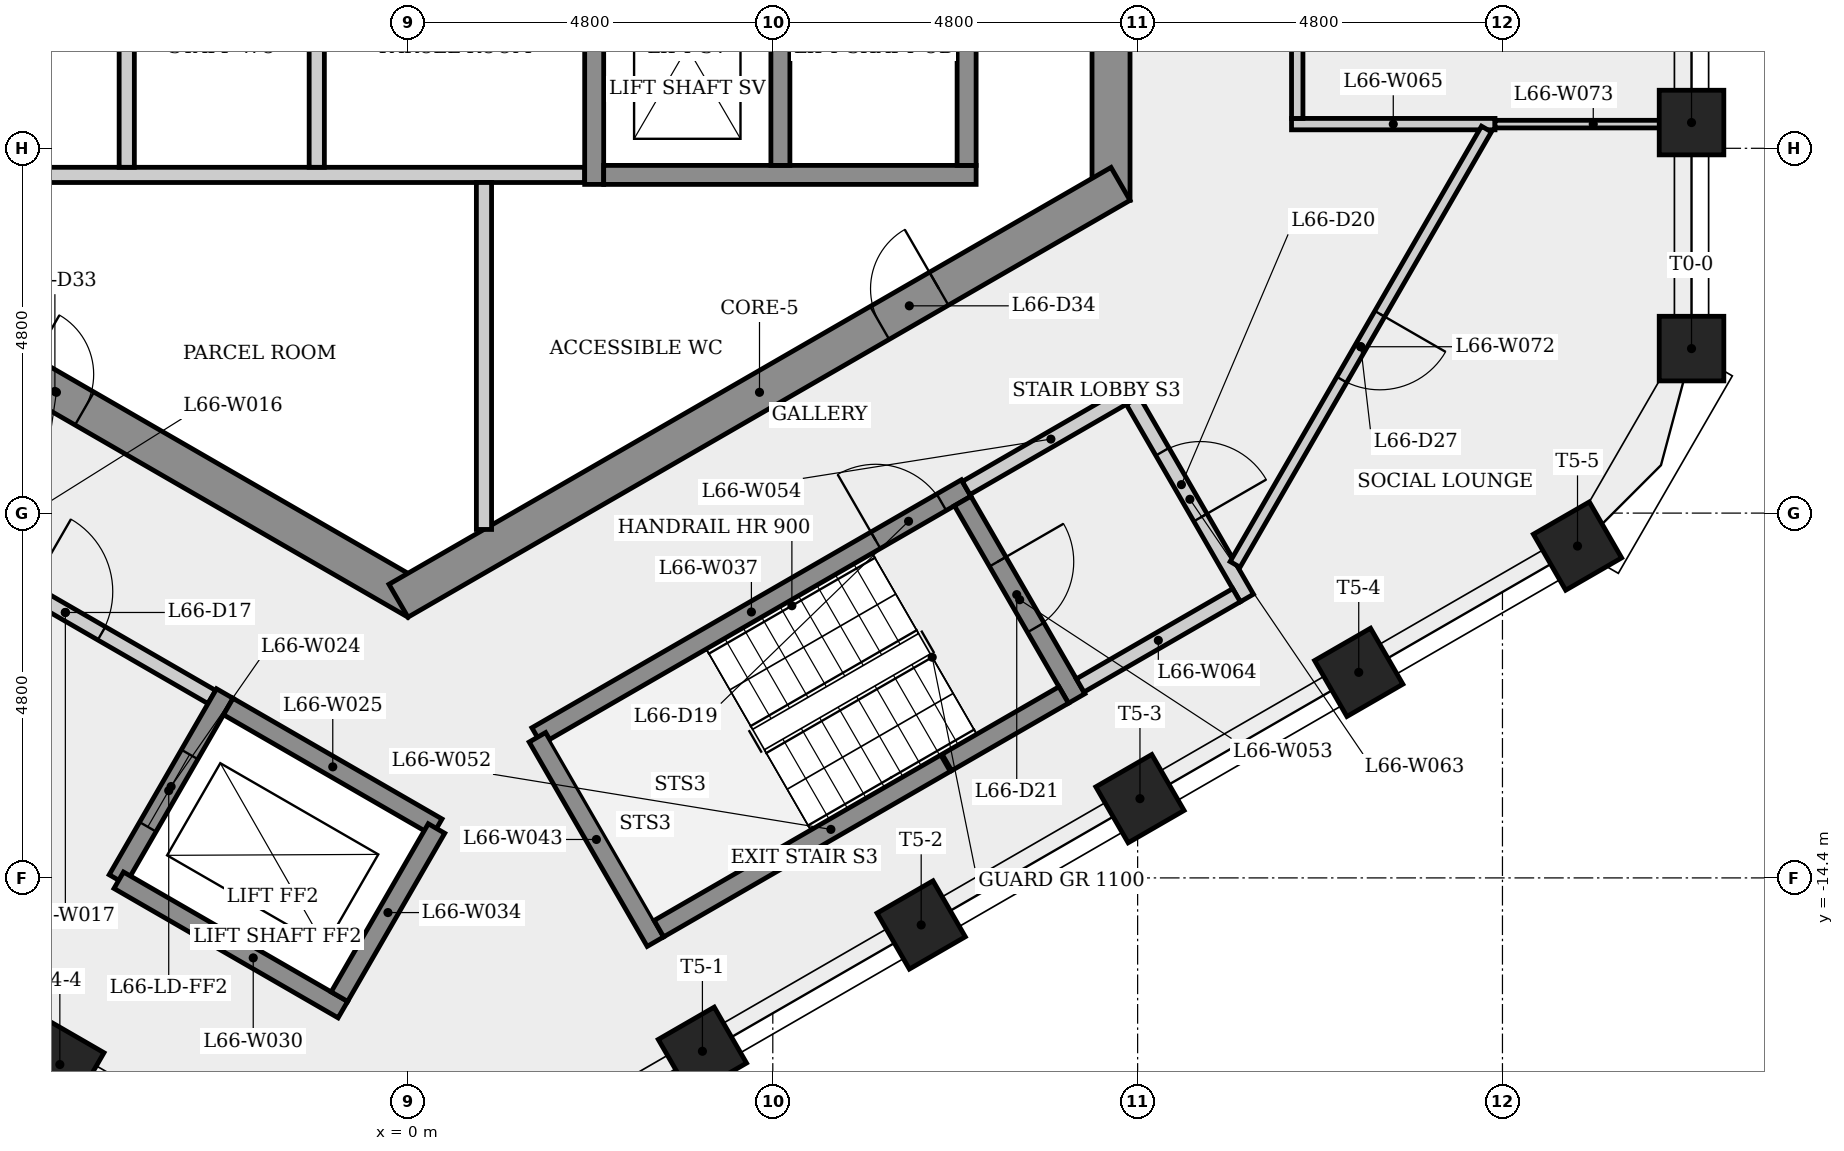
"""IFC4 building model, lengths in metres.
Left out: names, types, materials, properties, quantities, classifications, styles, units other than length and angle.
Written with IfcOpenShell. Run it as: python <this file> out.ifc"""

import sys

from ifc_helpers import new_model, si_unit, direction, frame, frame_2d, origin, origin_2d, place, context, subcontext, project, spatial, rectangle, extrude, element, fill, save


model = new_model("IFC4")
c1 = context("Model", 3, precision=1e-05, world=origin(), true_north=direction((0.0, 1.0)))
c2 = subcontext(c1, "Body", "Model", "MODEL_VIEW")
j1 = project(units=[si_unit("LENGTHUNIT", "METRE"), si_unit("PLANEANGLEUNIT", "RADIAN")], contexts=[c1])
p1 = place(None, origin())
s1 = spatial("IfcSite", under=j1, at=p1, CompositionType="ELEMENT")
p2 = place(p1, origin())
s2 = spatial("IfcBuilding", under=s1, at=p2, CompositionType="ELEMENT")
p3 = place(p2, frame((0.0, 0.0, 246.1)))
s3 = spatial("IfcBuildingStorey", under=s2, at=p3, CompositionType="ELEMENT", Elevation=246.1)
p4 = place(p3, frame((9.25, -5.485, 0.0), z_axis=(0.0, 0.0, 1.0), x_axis=(0.0, 1.0, 0.0)))
e1 = element("IfcWall", 1, at=p4, inside=s3, PredefinedType="SHEAR", context=c2, shape_type="SweptSolid", body=[
    extrude(rectangle(XDim=10.97, YDim=0.5, at=frame_2d((5.485, 0.0))), origin(), (0.0, 0.0, 1.0), 3.4),
])
p5 = place(p4, frame((4.685, 0.0, 0.0)))
e2 = element("IfcOpeningElement", 2, at=p5, cuts=e1, PredefinedType="OPENING", context=c2, shape_type="SweptSolid", body=[
    extrude(rectangle(XDim=1.6, YDim=2.1, at=frame_2d((0.8, 1.05))), frame((0.0, 0.26, 0.0), z_axis=(0.0, -1.0, 0.0), x_axis=(1.0, 0.0, 0.0)), (0.0, 0.0, 1.0), 0.52),
])
p6 = place(p3, frame((-9.375, -5.268, 0.0), z_axis=(0.0, 0.0, 1.0), x_axis=(0.866023993627, -0.500002442456, 0.0)))
e3 = element("IfcWall", 3, at=p6, inside=s3, PredefinedType="SHEAR", context=c2, shape_type="SweptSolid", body=[
    extrude(rectangle(XDim=10.97, YDim=0.5, at=frame_2d((5.485, 0.0))), origin(), (0.0, 0.0, 1.0), 3.4),
])
p7 = place(p6, frame((5.011, 0.0, 0.0)))
e4 = element("IfcOpeningElement", 4, at=p7, cuts=e3, PredefinedType="OPENING", context=c2, shape_type="SweptSolid", body=[
    extrude(rectangle(XDim=0.9, YDim=2.1, at=frame_2d((0.45, 1.05))), frame((0.0, 0.26, 0.0), z_axis=(0.0, -1.0, 0.0), x_axis=(1.0, 0.0, 0.0)), (0.0, 0.0, 1.0), 0.52),
])
p8 = place(p3, frame((-0.125, -10.753, 0.0), z_axis=(0.0, 0.0, 1.0), x_axis=(0.866023993627, 0.500002442456, 0.0)))
e5 = element("IfcWall", 5, at=p8, inside=s3, PredefinedType="SHEAR", context=c2, shape_type="SweptSolid", body=[
    extrude(rectangle(XDim=10.97, YDim=0.5, at=frame_2d((5.485, 0.0))), origin(), (0.0, 0.0, 1.0), 3.4),
])
p9 = place(p8, frame((7.311, 0.0, 0.0)))
e6 = element("IfcOpeningElement", 6, at=p9, cuts=e5, PredefinedType="OPENING", context=c2, shape_type="SweptSolid", body=[
    extrude(rectangle(XDim=0.9, YDim=2.1, at=frame_2d((0.45, 1.05))), frame((0.0, 0.26, 0.0), z_axis=(0.0, -1.0, 0.0), x_axis=(1.0, 0.0, 0.0)), (0.0, 0.0, 1.0), 0.52),
])
for number, where, z_axis, x_axis in (
    (7, (16.887, -7.436, 0.0), (0.0, 0.0, 1.0), (1.0, 0.0, 0.0)),
    (8, (16.887, -4.461, 0.0), (0.0, 0.0, 1.0), (1.0, 0.0, 0.0)),
    (9, (-4.58, -16.856, 0.0), (0.0, 0.0, 1.0), (-0.5, -0.866, 0.0)),
    (10, (3.874, -16.681, 0.0), (0.0, 0.0, 1.0), (0.5, -0.866, 0.0)),
    (11, (6.752, -15.019, 0.0), (0.0, 0.0, 1.0), (0.5, -0.866, 0.0)),
    (12, (9.631, -13.357, 0.0), (0.0, 0.0, 1.0), (0.5, -0.866, 0.0)),
    (13, (12.509, -11.695, 0.0), (0.0, 0.0, 1.0), (0.5, -0.866, 0.0)),
    (14, (15.387, -10.033, 0.0), (0.0, 0.0, 1.0), (0.5, -0.866, 0.0)),
):
    element("IfcColumn", number, at=place(p3, frame(where, z_axis=z_axis, x_axis=x_axis)), inside=s3, PredefinedType="COLUMN", context=c2, shape_type="SweptSolid", body=[
        extrude(rectangle(XDim=0.85, YDim=0.85, at=origin_2d()), origin(), (0.0, 0.0, 1.0), 3.4),
    ])
p10 = place(p3, frame((-9.0, -5.15, 0.0), z_axis=(0.0, 0.0, 1.0), x_axis=(1.0, 0.0, 0.0)))
e15 = element("IfcWall", 15, at=p10, inside=s3, PredefinedType="PARTITIONING", context=c2, shape_type="SweptSolid", body=[
    extrude(rectangle(XDim=11.325, YDim=0.2, at=frame_2d((5.663, 0.0))), origin(), (0.0, 0.0, 1.0), 3.05),
])
p11 = place(p3, frame((-6.435, -9.795, 0.0), z_axis=(0.0, 0.0, 1.0), x_axis=(0.866012907634, -0.500021643343, 0.0)))
e16 = element("IfcWall", 16, at=p11, inside=s3, PredefinedType="PARTITIONING", context=c2, shape_type="SweptSolid", body=[
    extrude(rectangle(XDim=4.45, YDim=0.2, at=frame_2d((2.225, 0.0))), origin(), (0.0, 0.0, 1.0), 3.05),
])
p12 = place(p11, frame((1.675, 0.0, 0.0)))
e17 = element("IfcOpeningElement", 17, at=p12, cuts=e16, PredefinedType="OPENING", context=c2, shape_type="SweptSolid", body=[
    extrude(rectangle(XDim=1.1, YDim=2.1, at=frame_2d((0.55, 1.05))), frame((0.0, 0.11, 0.0), z_axis=(0.0, -1.0, 0.0), x_axis=(1.0, 0.0, 0.0)), (0.0, 0.0, 1.0), 0.22),
])
p13 = place(p3, frame((-3.7, -1.9, 0.0), z_axis=(0.0, 0.0, 1.0), x_axis=(0.0, -1.0, 0.0)))
e18 = element("IfcWall", 18, at=p13, inside=s3, PredefinedType="PARTITIONING", context=c2, shape_type="SweptSolid", body=[
    extrude(rectangle(XDim=3.15, YDim=0.2, at=frame_2d((1.575, 0.0))), origin(), (0.0, 0.0, 1.0), 3.05),
])
p14 = place(p3, frame((-2.41, -11.974, 0.0), z_axis=(0.0, 0.0, 1.0), x_axis=(-0.49998675294, -0.866033051843, 0.0)))
e19 = element("IfcWall", 19, at=p14, inside=s3, PredefinedType="SHEAR", context=c2, shape_type="SweptSolid", body=[
    extrude(rectangle(XDim=2.825, YDim=0.25, at=frame_2d((1.413, 0.0))), origin(), (0.0, 0.0, 1.0), 3.05),
])
p15 = place(p14, frame((0.926, 0.0, 0.0)))
e20 = element("IfcOpeningElement", 20, at=p15, cuts=e19, PredefinedType="OPENING", context=c2, shape_type="SweptSolid", body=[
    extrude(rectangle(XDim=1.1, YDim=2.1, at=frame_2d((0.55, 1.05))), frame((0.0, 0.135, 0.0), z_axis=(0.0, -1.0, 0.0), x_axis=(1.0, 0.0, 0.0)), (0.0, 0.0, 1.0), 0.27),
])
p16 = place(p3, frame((-2.364, -12.145, 0.0), z_axis=(0.0, 0.0, 1.0), x_axis=(0.866048579423, -0.499959856469, 0.0)))
e21 = element("IfcWall", 21, at=p16, inside=s3, PredefinedType="SHEAR", context=c2, shape_type="SweptSolid", body=[
    extrude(rectangle(XDim=3.175, YDim=0.25, at=frame_2d((1.587, 0.0))), origin(), (0.0, 0.0, 1.0), 3.4),
])
p17 = place(p3, frame((-1.2, -1.9, 0.0), z_axis=(0.0, 0.0, 1.0), x_axis=(0.0, -1.0, 0.0)))
e22 = element("IfcWall", 22, at=p17, inside=s3, PredefinedType="PARTITIONING", context=c2, shape_type="SweptSolid", body=[
    extrude(rectangle(XDim=3.15, YDim=0.2, at=frame_2d((1.575, 0.0))), origin(), (0.0, 0.0, 1.0), 3.05),
])
p18 = place(p3, frame((-0.856, -16.133, 0.0), z_axis=(0.0, 0.0, 1.0), x_axis=(-0.866032748241, 0.499987278812, 0.0)))
e23 = element("IfcWall", 23, at=p18, inside=s3, PredefinedType="SHEAR", context=c2, shape_type="SweptSolid", body=[
    extrude(rectangle(XDim=3.405, YDim=0.25, at=frame_2d((1.702, 0.0))), origin(), (0.0, 0.0, 1.0), 3.05),
])
p19 = place(p3, frame((0.375, -13.75, 0.0), z_axis=(0.0, 0.0, 1.0), x_axis=(-0.50003400563, -0.866005769735, 0.0)))
e24 = element("IfcWall", 24, at=p19, inside=s3, PredefinedType="SHEAR", context=c2, shape_type="SweptSolid", body=[
    extrude(rectangle(XDim=2.555, YDim=0.25, at=frame_2d((1.277, 0.0))), origin(), (0.0, 0.0, 1.0), 3.4),
])
p20 = place(p3, frame((1.0, -5.25, 0.0), z_axis=(0.0, 0.0, 1.0), x_axis=(0.0, -1.0, 0.0)))
e25 = element("IfcWall", 25, at=p20, inside=s3, PredefinedType="PARTITIONING", context=c2, shape_type="SweptSolid", body=[
    extrude(rectangle(XDim=4.565, YDim=0.2, at=frame_2d((2.282, 0.0))), origin(), (0.0, 0.0, 1.0), 3.05),
])
p21 = place(p3, frame((1.693, -12.532, 0.0), z_axis=(0.0, 0.0, 1.0), x_axis=(0.866031063448, 0.499990197047, 0.0)))
e26 = element("IfcWall", 26, at=p21, inside=s3, PredefinedType="SHEAR", context=c2, shape_type="SweptSolid", body=[
    extrude(rectangle(XDim=6.525, YDim=0.25, at=frame_2d((3.263, 0.0))), origin(), (0.0, 0.0, 1.0), 3.05),
])
p22 = place(p21, frame((5.15, 0.0, 0.0)))
e27 = element("IfcOpeningElement", 27, at=p22, cuts=e26, PredefinedType="OPENING", context=c2, shape_type="SweptSolid", body=[
    extrude(rectangle(XDim=1.0, YDim=2.1, at=frame_2d((0.5, 1.05))), frame((0.0, 0.135, 0.0), z_axis=(0.0, -1.0, 0.0), x_axis=(1.0, 0.0, 0.0)), (0.0, 0.0, 1.0), 0.27),
])
p23 = place(p3, frame((2.45, -5.275, 0.0), z_axis=(0.0, 0.0, 1.0), x_axis=(0.0, 1.0, 0.0)))
e28 = element("IfcWall", 28, at=p23, inside=s3, PredefinedType="SHEAR", context=c2, shape_type="SweptSolid", body=[
    extrude(rectangle(XDim=3.6, YDim=0.25, at=frame_2d((1.8, 0.0))), origin(), (0.0, 0.0, 1.0), 3.05),
])
p24 = place(p3, frame((3.256, -15.239, 0.0), z_axis=(0.0, 0.0, 1.0), x_axis=(-0.500003782172, 0.866023220135, 0.0)))
e29 = element("IfcWall", 29, at=p24, inside=s3, PredefinedType="SHEAR", context=c2, shape_type="SweptSolid", body=[
    extrude(rectangle(XDim=3.105, YDim=0.25, at=frame_2d((1.552, 0.0))), origin(), (0.0, 0.0, 1.0), 3.05),
])
p25 = place(p3, frame((2.575, -5.15, 0.0), z_axis=(0.0, 0.0, 1.0), x_axis=(1.0, 0.0, 0.0)))
e30 = element("IfcWall", 30, at=p25, inside=s3, PredefinedType="SHEAR", context=c2, shape_type="SweptSolid", body=[
    extrude(rectangle(XDim=4.9, YDim=0.25, at=frame_2d((2.45, 0.0))), origin(), (0.0, 0.0, 1.0), 3.05),
])
p26 = place(p3, frame((4.9, -1.925, 0.0), z_axis=(0.0, 0.0, 1.0), x_axis=(0.0, -1.0, 0.0)))
e31 = element("IfcWall", 31, at=p26, inside=s3, PredefinedType="SHEAR", context=c2, shape_type="SweptSolid", body=[
    extrude(rectangle(XDim=3.1, YDim=0.25, at=frame_2d((1.55, 0.0))), origin(), (0.0, 0.0, 1.0), 3.4),
])
p27 = place(p3, frame((7.073, -12.891, 0.0), z_axis=(0.0, 0.0, 1.0), x_axis=(-0.866023145199, -0.500003911965, 0.0)))
e32 = element("IfcWall", 32, at=p27, inside=s3, PredefinedType="SHEAR", context=c2, shape_type="SweptSolid", body=[
    extrude(rectangle(XDim=4.355, YDim=0.25, at=frame_2d((2.177, 0.0))), origin(), (0.0, 0.0, 1.0), 3.05),
])
p28 = place(p3, frame((7.298, -9.441, 0.0), z_axis=(0.0, 0.0, 1.0), x_axis=(0.50002537861, -0.866010750942, 0.0)))
e33 = element("IfcWall", 33, at=p28, inside=s3, PredefinedType="SHEAR", context=c2, shape_type="SweptSolid", body=[
    extrude(rectangle(XDim=3.0, YDim=0.25, at=frame_2d((1.5, 0.0))), origin(), (0.0, 0.0, 1.0), 3.05),
])
p29 = place(p28, frame((0.923, 0.0, 0.0)))
e34 = element("IfcOpeningElement", 34, at=p29, cuts=e33, PredefinedType="OPENING", context=c2, shape_type="SweptSolid", body=[
    extrude(rectangle(XDim=1.0, YDim=2.1, at=frame_2d((0.5, 1.05))), frame((0.0, 0.135, 0.0), z_axis=(0.0, -1.0, 0.0), x_axis=(1.0, 0.0, 0.0)), (0.0, 0.0, 1.0), 0.27),
])
p30 = place(p3, frame((7.344, -9.27, 0.0), z_axis=(0.0, 0.0, 1.0), x_axis=(0.866005588531, 0.500034319456, 0.0)))
e35 = element("IfcWall", 35, at=p30, inside=s3, PredefinedType="PARTITIONING", context=c2, shape_type="SweptSolid", body=[
    extrude(rectangle(XDim=2.575, YDim=0.2, at=frame_2d((1.288, 0.0))), origin(), (0.0, 0.0, 1.0), 3.05),
])
p31 = place(p3, frame((7.35, -1.925, 0.0), z_axis=(0.0, 0.0, 1.0), x_axis=(0.0, -1.0, 0.0)))
e36 = element("IfcWall", 36, at=p31, inside=s3, PredefinedType="SHEAR", context=c2, shape_type="SweptSolid", body=[
    extrude(rectangle(XDim=3.1, YDim=0.25, at=frame_2d((1.55, 0.0))), origin(), (0.0, 0.0, 1.0), 3.4),
])
p32 = place(p3, frame((8.627, -11.993, 0.0), z_axis=(0.0, 0.0, 1.0), x_axis=(-0.866059624469, -0.499940723351, 0.0)))
e37 = element("IfcWall", 37, at=p32, inside=s3, PredefinedType="SHEAR", context=c2, shape_type="SweptSolid", body=[
    extrude(rectangle(XDim=1.775, YDim=0.25, at=frame_2d((0.888, 0.0))), origin(), (0.0, 0.0, 1.0), 3.05),
])
p33 = place(p3, frame((9.537, -8.119, 0.0), z_axis=(0.0, 0.0, 1.0), x_axis=(0.499990139034, -0.866031096941, 0.0)))
e38 = element("IfcWall", 38, at=p33, inside=s3, PredefinedType="PARTITIONING", context=c2, shape_type="SweptSolid", body=[
    extrude(rectangle(XDim=3.0, YDim=0.2, at=frame_2d((1.5, 0.0))), origin(), (0.0, 0.0, 1.0), 3.05),
])
p34 = place(p33, frame((0.778, 0.0, 0.0)))
e39 = element("IfcOpeningElement", 39, at=p34, cuts=e38, PredefinedType="OPENING", context=c2, shape_type="SweptSolid", body=[
    extrude(rectangle(XDim=1.0, YDim=2.1, at=frame_2d((0.5, 1.05))), frame((0.0, 0.11, 0.0), z_axis=(0.0, -1.0, 0.0), x_axis=(1.0, 0.0, 0.0)), (0.0, 0.0, 1.0), 0.22),
])
p35 = place(p3, frame((10.901, -10.681, 0.0), z_axis=(0.0, 0.0, 1.0), x_axis=(-0.866007538022, -0.500030943131, 0.0)))
e40 = element("IfcWall", 40, at=p35, inside=s3, PredefinedType="PARTITIONING", context=c2, shape_type="SweptSolid", body=[
    extrude(rectangle(XDim=2.375, YDim=0.2, at=frame_2d((1.188, 0.0))), origin(), (0.0, 0.0, 1.0), 3.05),
])
p36 = place(p3, frame((11.625, -4.482, 0.0), z_axis=(0.0, 0.0, 1.0), x_axis=(1.0, 0.0, 0.0)))
e41 = element("IfcWall", 41, at=p36, inside=s3, PredefinedType="PARTITIONING", context=c2, shape_type="SweptSolid", body=[
    extrude(rectangle(XDim=2.677, YDim=0.15, at=frame_2d((1.338, 0.0))), origin(), (0.0, 0.0, 1.0), 3.05),
])
p37 = place(p3, frame((11.7, 4.557, 0.0), z_axis=(0.0, 0.0, 1.0), x_axis=(0.0, -1.0, 0.0)))
e42 = element("IfcWall", 42, at=p37, inside=s3, PredefinedType="PARTITIONING", context=c2, shape_type="SweptSolid", body=[
    extrude(rectangle(XDim=8.964, YDim=0.15, at=frame_2d((4.482, 0.0))), origin(), (0.0, 0.0, 1.0), 3.05),
])
p38 = place(p37, frame((4.034, 0.0, 0.0)))
e43 = element("IfcOpeningElement", 43, at=p38, cuts=e42, PredefinedType="OPENING", context=c2, shape_type="SweptSolid", body=[
    extrude(rectangle(XDim=1.0, YDim=2.1, at=frame_2d((0.5, 1.05))), frame((0.0, 0.085, 0.0), z_axis=(0.0, -1.0, 0.0), x_axis=(1.0, 0.0, 0.0)), (0.0, 0.0, 1.0), 0.17),
])
p39 = place(p3, frame((14.189, -4.547, 0.0), z_axis=(0.0, 0.0, 1.0), x_axis=(-0.500017457343, -0.866015324548, 0.0)))
e44 = element("IfcWall", 44, at=p39, inside=s3, PredefinedType="PARTITIONING", context=c2, shape_type="SweptSolid", body=[
    extrude(rectangle(XDim=6.615, YDim=0.15, at=frame_2d((3.307, 0.0))), origin(), (0.0, 0.0, 1.0), 3.05),
])
p40 = place(p39, frame((2.807, 0.0, 0.0)))
e45 = element("IfcOpeningElement", 45, at=p40, cuts=e44, PredefinedType="OPENING", context=c2, shape_type="SweptSolid", body=[
    extrude(rectangle(XDim=1.0, YDim=2.1, at=frame_2d((0.5, 1.05))), frame((0.0, 0.085, 0.0), z_axis=(0.0, -1.0, 0.0), x_axis=(1.0, 0.0, 0.0)), (0.0, 0.0, 1.0), 0.17),
])
p41 = place(p3, frame((16.887, -4.482, 0.0), z_axis=(0.0, 0.0, 1.0), x_axis=(-1.0, 0.0, 0.0)))
e46 = element("IfcWall", 46, at=p41, inside=s3, PredefinedType="PARTITIONING", context=c2, shape_type="SweptSolid", body=[
    extrude(rectangle(XDim=2.586, YDim=0.1, at=frame_2d((1.293, 0.0))), origin(), (0.0, 0.0, 1.0), 3.05),
])
p42 = place(p12, origin())
e47 = element("IfcDoor", 47, at=p42, inside=s3, OperationType="SINGLE_SWING_LEFT", PredefinedType="DOOR", context=c2, shape_type="SweptSolid", body=[
    extrude(rectangle(XDim=1.1, YDim=2.1, at=frame_2d((0.55, 1.05))), frame((0.0, 0.025, 0.0), z_axis=(0.0, -1.0, 0.0), x_axis=(1.0, 0.0, 0.0)), (0.0, 0.0, 1.0), 0.05),
])
fill(e17, e47)
p43 = place(p15, origin())
e48 = element("IfcDoor", 48, at=p43, inside=s3, OperationType="SLIDING_TO_LEFT", PredefinedType="DOOR", context=c2, shape_type="SweptSolid", body=[
    extrude(rectangle(XDim=1.1, YDim=2.1, at=frame_2d((0.55, 1.05))), frame((0.0, 0.025, 0.0), z_axis=(0.0, -1.0, 0.0), x_axis=(1.0, 0.0, 0.0)), (0.0, 0.0, 1.0), 0.05),
])
fill(e20, e48)
p44 = place(p22, origin())
e49 = element("IfcDoor", 49, at=p44, inside=s3, OperationType="SINGLE_SWING_LEFT", PredefinedType="DOOR", context=c2, shape_type="SweptSolid", body=[
    extrude(rectangle(XDim=1.0, YDim=2.1, at=frame_2d((0.5, 1.05))), frame((0.0, 0.025, 0.0), z_axis=(0.0, -1.0, 0.0), x_axis=(1.0, 0.0, 0.0)), (0.0, 0.0, 1.0), 0.05),
])
fill(e27, e49)
p45 = place(p34, origin())
e50 = element("IfcDoor", 50, at=p45, inside=s3, OperationType="SINGLE_SWING_RIGHT", PredefinedType="DOOR", context=c2, shape_type="SweptSolid", body=[
    extrude(rectangle(XDim=1.0, YDim=2.1, at=frame_2d((0.5, 1.05))), frame((0.0, 0.025, 0.0), z_axis=(0.0, -1.0, 0.0), x_axis=(1.0, 0.0, 0.0)), (0.0, 0.0, 1.0), 0.05),
])
fill(e39, e50)
p46 = place(p29, origin())
e51 = element("IfcDoor", 51, at=p46, inside=s3, OperationType="SINGLE_SWING_LEFT", PredefinedType="DOOR", context=c2, shape_type="SweptSolid", body=[
    extrude(rectangle(XDim=1.0, YDim=2.1, at=frame_2d((0.5, 1.05))), frame((0.0, 0.025, 0.0), z_axis=(0.0, -1.0, 0.0), x_axis=(1.0, 0.0, 0.0)), (0.0, 0.0, 1.0), 0.05),
])
fill(e34, e51)
p47 = place(p40, origin())
e52 = element("IfcDoor", 52, at=p47, inside=s3, OperationType="SINGLE_SWING_LEFT", PredefinedType="DOOR", context=c2, shape_type="SweptSolid", body=[
    extrude(rectangle(XDim=1.0, YDim=2.1, at=frame_2d((0.5, 1.05))), frame((0.0, 0.025, 0.0), z_axis=(0.0, -1.0, 0.0), x_axis=(1.0, 0.0, 0.0)), (0.0, 0.0, 1.0), 0.05),
])
fill(e45, e52)
p48 = place(p7, origin())
e53 = element("IfcDoor", 53, at=p48, inside=s3, OperationType="SINGLE_SWING_LEFT", PredefinedType="DOOR", context=c2, shape_type="SweptSolid", body=[
    extrude(rectangle(XDim=0.9, YDim=2.1, at=frame_2d((0.45, 1.05))), frame((0.0, 0.025, 0.0), z_axis=(0.0, -1.0, 0.0), x_axis=(1.0, 0.0, 0.0)), (0.0, 0.0, 1.0), 0.05),
])
fill(e4, e53)
p49 = place(p9, origin())
e54 = element("IfcDoor", 54, at=p49, inside=s3, OperationType="SINGLE_SWING_RIGHT", PredefinedType="DOOR", context=c2, shape_type="SweptSolid", body=[
    extrude(rectangle(XDim=0.9, YDim=2.1, at=frame_2d((0.45, 1.05))), frame((0.0, 0.025, 0.0), z_axis=(0.0, -1.0, 0.0), x_axis=(1.0, 0.0, 0.0)), (0.0, 0.0, 1.0), 0.05),
])
fill(e6, e54)
save(model, sys.argv[1])
